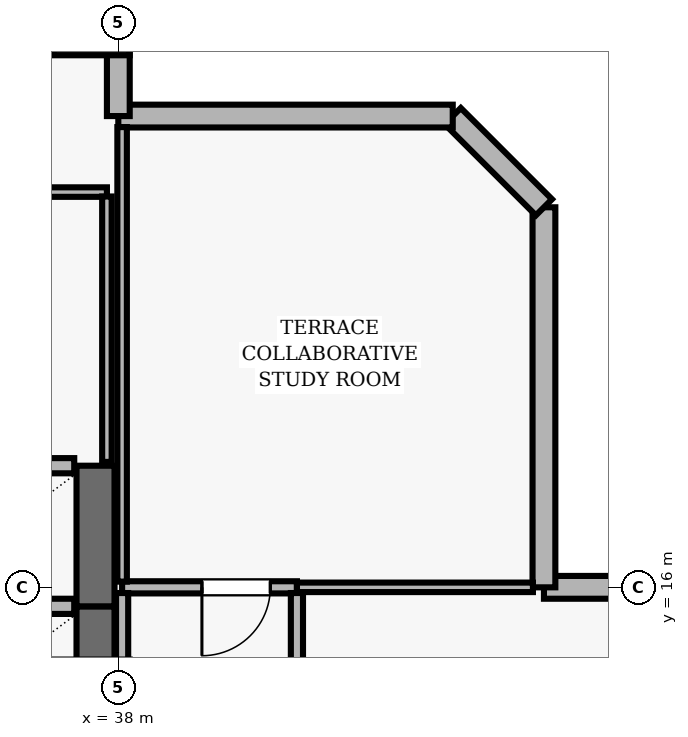
"""IFC4 building model, lengths in metres.
Left out: names, types, materials, properties, quantities, classifications, styles, units other than length and angle.
Written with IfcOpenShell. Run it as: python <this file> out.ifc"""

import sys

from ifc_helpers import new_model, si_unit, direction, frame, frame_2d, origin, origin_2d, place, context, subcontext, project, spatial, rectangle, extrude, element, fill, save


model = new_model("IFC4")
c1 = context("Model", 3, precision=1e-05, world=origin(), true_north=direction((0.0, 1.0)))
c2 = subcontext(c1, "Body", "Model", "MODEL_VIEW")
j1 = project(units=[si_unit("LENGTHUNIT", "METRE"), si_unit("PLANEANGLEUNIT", "RADIAN")], contexts=[c1])
p1 = place(None, origin())
s1 = spatial("IfcSite", under=j1, at=p1, CompositionType="ELEMENT")
p2 = place(p1, origin())
s2 = spatial("IfcBuilding", under=s1, at=p2, CompositionType="ELEMENT")
p3 = place(p2, frame((0.0, 0.0, 234.3)))
s3 = spatial("IfcBuildingStorey", under=s2, at=p3, CompositionType="ELEMENT", Elevation=234.3)
p4 = place(p3, frame((37.65, 23.5, 0.0), z_axis=(0.0, 0.0, 1.0), x_axis=(1.0, 0.0, 0.0)))
e1 = element("IfcColumn", 1, at=p4, inside=s3, PredefinedType="COLUMN", context=c2, shape_type="SweptSolid", body=[
    extrude(rectangle(XDim=1.0, YDim=1.0, at=origin_2d()), origin(), (0.0, 0.0, 1.0), 3.9),
])
p5 = place(p3, frame((62.7, 16.0, 0.0), z_axis=(0.0, 0.0, 1.0), x_axis=(-1.0, 0.0, 0.0)))
e2 = element("IfcWall", 2, at=p5, inside=s3, PredefinedType="SOLIDWALL", context=c2, shape_type="SweptSolid", body=[
    extrude(rectangle(XDim=19.1, YDim=0.3, at=frame_2d((9.55, 0.0))), origin(), (0.0, 0.0, 1.0), 3.64),
])
p6 = place(p5, frame((6.75, 0.0, 0.0)))
e3 = element("IfcOpeningElement", 3, at=p6, cuts=e2, PredefinedType="OPENING", context=c2, shape_type="SweptSolid", body=[
    extrude(rectangle(XDim=1.0, YDim=2.2, at=frame_2d((0.5, 1.1))), frame((0.0, 0.16, 0.0), z_axis=(0.0, -1.0, 0.0), x_axis=(1.0, 0.0, 0.0)), (0.0, 0.0, 1.0), 0.32),
])
p7 = place(p5, frame((14.267, 0.0, 0.9)))
e4 = element("IfcOpeningElement", 4, at=p7, cuts=e2, PredefinedType="OPENING", context=c2, shape_type="SweptSolid", body=[
    extrude(rectangle(XDim=1.5, YDim=1.6, at=frame_2d((0.75, 0.8))), frame((0.0, 0.16, 0.0), z_axis=(0.0, -1.0, 0.0), x_axis=(1.0, 0.0, 0.0)), (0.0, 0.0, 1.0), 0.32),
])
p8 = place(p3, frame((43.6, 16.0, 0.0), z_axis=(0.0, 0.0, 1.0), x_axis=(0.0, 1.0, 0.0)))
e5 = element("IfcWall", 5, at=p8, inside=s3, PredefinedType="SOLIDWALL", context=c2, shape_type="SweptSolid", body=[
    extrude(rectangle(XDim=5.0, YDim=0.3, at=frame_2d((2.5, 0.0))), origin(), (0.0, 0.0, 1.0), 3.64),
])
p9 = place(p3, frame((43.6, 21.0, 0.0), z_axis=(0.0, 0.0, 1.0), x_axis=(-0.707178703759, 0.707034851297, 0.0)))
e6 = element("IfcWall", 6, at=p9, inside=s3, PredefinedType="SOLIDWALL", context=c2, shape_type="SweptSolid", body=[
    extrude(rectangle(XDim=1.697, YDim=0.3, at=frame_2d((0.849, 0.0))), origin(), (0.0, 0.0, 1.0), 3.64),
])
p10 = place(p3, frame((42.4, 22.2, 0.0), z_axis=(0.0, 0.0, 1.0), x_axis=(-1.0, 0.0, 0.0)))
e7 = element("IfcWall", 7, at=p10, inside=s3, PredefinedType="SOLIDWALL", context=c2, shape_type="SweptSolid", body=[
    extrude(rectangle(XDim=4.4, YDim=0.3, at=frame_2d((2.2, 0.0))), origin(), (0.0, 0.0, 1.0), 3.64),
])
p11 = place(p3, frame((38.0, 22.2, 0.0), z_axis=(0.0, 0.0, 1.0), x_axis=(0.0, 1.0, 0.0)))
e8 = element("IfcWall", 8, at=p11, inside=s3, PredefinedType="SOLIDWALL", context=c2, shape_type="SweptSolid", body=[
    extrude(rectangle(XDim=18.5, YDim=0.3, at=frame_2d((9.25, 0.0))), origin(), (0.0, 0.0, 1.0), 3.64),
])
p12 = place(p11, frame((11.05, 0.0, 0.0)))
e9 = element("IfcOpeningElement", 9, at=p12, cuts=e8, PredefinedType="OPENING", context=c2, shape_type="SweptSolid", body=[
    extrude(rectangle(XDim=1.0, YDim=2.2, at=frame_2d((0.5, 1.1))), frame((0.0, 0.16, 0.0), z_axis=(0.0, -1.0, 0.0), x_axis=(1.0, 0.0, 0.0)), (0.0, 0.0, 1.0), 0.32),
])
p13 = place(p3, frame((37.7, 13.9, 0.0), z_axis=(0.0, 0.0, 1.0), x_axis=(0.0, 1.0, 0.0)))
e10 = element("IfcWall", 10, at=p13, inside=s3, PredefinedType="SHEAR", context=c2, shape_type="SweptSolid", body=[
    extrude(rectangle(XDim=1.85, YDim=0.5, at=frame_2d((0.925, 0.0))), origin(), (0.0, 0.0, 1.0), 3.64),
])
p14 = place(p3, frame((37.42, 15.75, 0.0), z_axis=(0.0, 0.0, 1.0), x_axis=(-1.0, 0.0, 0.0)))
e11 = element("IfcWall", 11, at=p14, inside=s3, PredefinedType="SOLIDWALL", context=c2, shape_type="SweptSolid", body=[
    extrude(rectangle(XDim=2.14, YDim=0.2, at=frame_2d((1.07, 0.0))), origin(), (0.0, 0.0, 1.0), 3.64),
])
p15 = place(p3, frame((37.7, 15.75, 0.0), z_axis=(0.0, 0.0, 1.0), x_axis=(0.0, 1.0, 0.0)))
e12 = element("IfcWall", 12, at=p15, inside=s3, PredefinedType="SHEAR", context=c2, shape_type="SweptSolid", body=[
    extrude(rectangle(XDim=1.85, YDim=0.5, at=frame_2d((0.925, 0.0))), origin(), (0.0, 0.0, 1.0), 3.64),
])
p16 = place(p3, frame((37.42, 17.6, 0.0), z_axis=(0.0, 0.0, 1.0), x_axis=(-1.0, 0.0, 0.0)))
e13 = element("IfcWall", 13, at=p16, inside=s3, PredefinedType="SOLIDWALL", context=c2, shape_type="SweptSolid", body=[
    extrude(rectangle(XDim=2.14, YDim=0.2, at=frame_2d((1.07, 0.0))), origin(), (0.0, 0.0, 1.0), 3.64),
])
p17 = place(p3, frame((35.85, 21.2, 0.0), z_axis=(0.0, 0.0, 1.0), x_axis=(1.0, 0.0, 0.0)))
e14 = element("IfcWall", 14, at=p17, inside=s3, PredefinedType="PARTITIONING", context=c2, shape_type="SweptSolid", body=[
    extrude(rectangle(XDim=2.0, YDim=0.125, at=frame_2d((1.0, 0.0))), origin(), (0.0, 0.0, 1.0), 3.64),
])
p18 = place(p3, frame((40.35, 16.0, 0.0), z_axis=(0.0, 0.0, 1.0), x_axis=(-1.0, 0.0, 0.0)))
e15 = element("IfcWall", 15, at=p18, inside=s3, PredefinedType="PARTITIONING", context=c2, shape_type="SweptSolid", body=[
    extrude(rectangle(XDim=2.3, YDim=0.16, at=frame_2d((1.15, 0.0))), origin(), (0.0, 0.0, 1.0), 3.64),
])
p19 = place(p18, frame((0.35, 0.0, 0.0)))
e16 = element("IfcOpeningElement", 16, at=p19, cuts=e15, PredefinedType="OPENING", context=c2, shape_type="SweptSolid", body=[
    extrude(rectangle(XDim=0.9, YDim=2.1, at=frame_2d((0.45, 1.05))), frame((0.0, 0.09, 0.0), z_axis=(0.0, -1.0, 0.0), x_axis=(1.0, 0.0, 0.0)), (0.0, 0.0, 1.0), 0.18),
])
p20 = place(p3, frame((40.35, 16.0, 0.0), z_axis=(0.0, 0.0, 1.0), x_axis=(1.0, 0.0, 0.0)))
e17 = element("IfcWall", 17, at=p20, inside=s3, PredefinedType="PARTITIONING", context=c2, shape_type="SweptSolid", body=[
    extrude(rectangle(XDim=3.105, YDim=0.125, at=frame_2d((1.552, 0.0))), origin(), (0.0, 0.0, 1.0), 3.64),
])
p21 = place(p3, frame((37.85, 17.65, 0.0), z_axis=(0.0, 0.0, 1.0), x_axis=(0.0, 1.0, 0.0)))
e18 = element("IfcWall", 18, at=p21, inside=s3, PredefinedType="PARTITIONING", context=c2, shape_type="SweptSolid", body=[
    extrude(rectangle(XDim=3.492, YDim=0.125, at=frame_2d((1.746, 0.0))), origin(), (0.0, 0.0, 1.0), 3.096),
])
p22 = place(p3, frame((38.05, 15.925, 0.0), z_axis=(0.0, 0.0, 1.0), x_axis=(0.0, -1.0, 0.0)))
e19 = element("IfcWall", 19, at=p22, inside=s3, PredefinedType="PARTITIONING", context=c2, shape_type="SweptSolid", body=[
    extrude(rectangle(XDim=6.375, YDim=0.16, at=frame_2d((3.188, 0.0))), origin(), (0.0, 0.0, 1.0), 3.096),
])
p23 = place(p3, frame((38.05, 22.055, 0.0), z_axis=(0.0, 0.0, 1.0), x_axis=(0.0, -1.0, 0.0)))
e20 = element("IfcWall", 20, at=p23, inside=s3, PredefinedType="PARTITIONING", context=c2, shape_type="SweptSolid", body=[
    extrude(rectangle(XDim=5.98, YDim=0.125, at=frame_2d((2.99, 0.0))), origin(), (0.0, 0.0, 1.0), 3.096),
])
p24 = place(p3, frame((40.35, 7.625, 0.0), z_axis=(0.0, 0.0, 1.0), x_axis=(0.0, 1.0, 0.0)))
e21 = element("IfcWall", 21, at=p24, inside=s3, PredefinedType="PARTITIONING", context=c2, shape_type="SweptSolid", body=[
    extrude(rectangle(XDim=8.3, YDim=0.16, at=frame_2d((4.15, 0.0))), origin(), (0.0, 0.0, 1.0), 3.64),
])
p25 = place(p24, frame((3.65, 0.0, 0.0)))
e22 = element("IfcOpeningElement", 22, at=p25, cuts=e21, PredefinedType="OPENING", context=c2, shape_type="SweptSolid", body=[
    extrude(rectangle(XDim=1.0, YDim=2.1, at=frame_2d((0.5, 1.05))), frame((0.0, 0.09, 0.0), z_axis=(0.0, -1.0, 0.0), x_axis=(1.0, 0.0, 0.0)), (0.0, 0.0, 1.0), 0.18),
])
p26 = place(p19, origin())
e23 = element("IfcDoor", 23, at=p26, inside=s3, OperationType="SINGLE_SWING_RIGHT", PredefinedType="DOOR", context=c2, shape_type="SweptSolid", body=[
    extrude(rectangle(XDim=0.9, YDim=2.1, at=frame_2d((0.45, 1.05))), frame((0.0, 0.025, 0.0), z_axis=(0.0, -1.0, 0.0), x_axis=(1.0, 0.0, 0.0)), (0.0, 0.0, 1.0), 0.05),
])
fill(e16, e23)
save(model, sys.argv[1])
